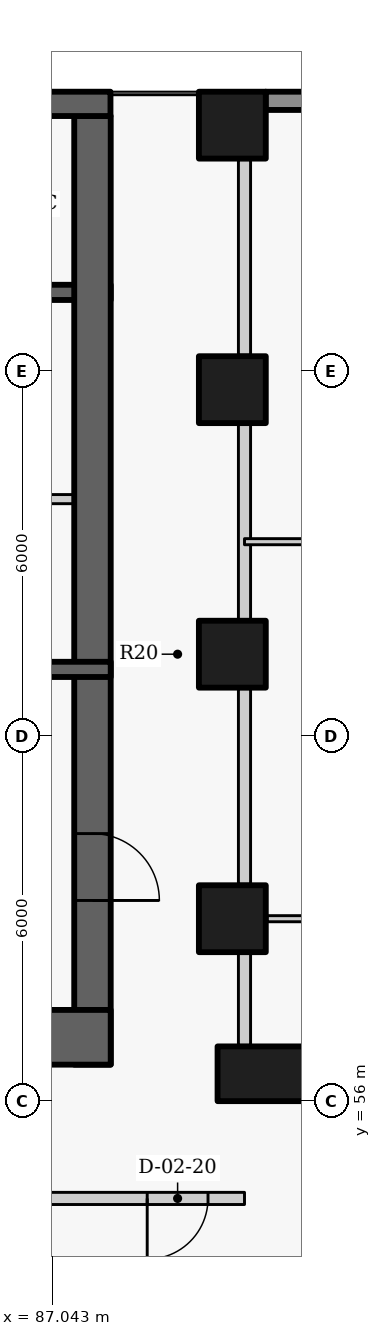
"""IFC4 building model, lengths in metres.
Left out: names, types, materials, properties, quantities, classifications, styles, units other than length and angle.
Written with IfcOpenShell. Run it as: python <this file> out.ifc"""

import sys

from ifc_helpers import new_model, si_unit, direction, frame, frame_2d, origin, origin_2d, place, context, subcontext, project, spatial, rectangle, extrude, element, fill, save


model = new_model("IFC4")
c1 = context("Model", 3, precision=1e-05, world=origin(), true_north=direction((0.0, 1.0)))
c2 = subcontext(c1, "Body", "Model", "MODEL_VIEW")
j1 = project(units=[si_unit("LENGTHUNIT", "METRE"), si_unit("PLANEANGLEUNIT", "RADIAN")], contexts=[c1])
p1 = place(None, origin())
s1 = spatial("IfcSite", under=j1, at=p1, CompositionType="ELEMENT")
p2 = place(p1, origin())
s2 = spatial("IfcBuilding", under=s1, at=p2, CompositionType="ELEMENT")
p3 = place(p2, frame((0.0, 0.0, 11.4)))
s3 = spatial("IfcBuildingStorey", under=s2, at=p3, CompositionType="ELEMENT", Elevation=11.4)
p4 = place(p3, frame((90.507, 56.45, 0.0), z_axis=(0.0, 0.0, 1.0), x_axis=(1.0, 0.0, 0.0)))
e1 = element("IfcColumn", 1, at=p4, inside=s3, PredefinedType="COLUMN", context=c2, shape_type="SweptSolid", body=[
    extrude(rectangle(XDim=1.5, YDim=0.9, at=origin_2d()), origin(), (0.0, 0.0, 1.0), 4.2),
])
for number, where, z_axis, x_axis in (
    (2, (90.0, 59.0, 0.0), (0.0, 0.0, 1.0), (0.0, 1.0, 0.0)),
    (3, (90.0, 63.35, 0.0), (0.0, 0.0, 1.0), (0.0, 1.0, 0.0)),
    (4, (90.0, 67.7, 0.0), (0.0, 0.0, 1.0), (0.0, 1.0, 0.0)),
    (5, (90.0, 72.05, 0.0), (0.0, 0.0, 1.0), (0.0, 1.0, 0.0)),
):
    element("IfcColumn", number, at=place(p3, frame(where, z_axis=z_axis, x_axis=x_axis)), inside=s3, PredefinedType="COLUMN", context=c2, shape_type="SweptSolid", body=[
        extrude(rectangle(XDim=1.1, YDim=1.1, at=origin_2d()), origin(), (0.0, 0.0, 1.0), 4.2),
    ])
p5 = place(p3, frame((96.562, 72.45, 0.0), z_axis=(0.0, 0.0, 1.0), x_axis=(-1.0, 0.0, 0.0)))
e6 = element("IfcWall", 6, at=p5, inside=s3, PredefinedType="SOLIDWALL", context=c2, shape_type="SweptSolid", body=[
    extrude(rectangle(XDim=6.016, YDim=0.3, at=frame_2d((3.008, 0.0))), origin(), (0.0, 0.0, 1.0), 3.0),
])
p6 = place(p5, frame((1.958, 0.0, 0.9)))
e7 = element("IfcOpeningElement", 7, at=p6, cuts=e6, PredefinedType="OPENING", context=c2, shape_type="SweptSolid", body=[
    extrude(rectangle(XDim=2.1, YDim=2.05, at=frame_2d((1.05, 1.025))), frame((0.0, 0.16, 0.0), z_axis=(0.0, -1.0, 0.0), x_axis=(1.0, 0.0, 0.0)), (0.0, 0.0, 1.0), 0.32),
])
p7 = place(p3, frame((85.4, 69.3, -0.3), z_axis=(0.0, 0.0, 1.0), x_axis=(1.0, 0.0, 0.0)))
e8 = element("IfcWall", 8, at=p7, inside=s3, PredefinedType="SHEAR", context=c2, shape_type="SweptSolid", body=[
    extrude(rectangle(XDim=2.6, YDim=0.25, at=frame_2d((1.3, 0.0))), origin(), (0.0, 0.0, 1.0), 4.2),
])
p8 = place(p7, frame((0.525, 0.0, 0.3)))
e9 = element("IfcOpeningElement", 9, at=p8, cuts=e8, PredefinedType="OPENING", context=c2, shape_type="SweptSolid", body=[
    extrude(rectangle(XDim=0.9, YDim=2.1, at=frame_2d((0.45, 1.05))), frame((0.0, 0.135, 0.0), z_axis=(0.0, -1.0, 0.0), x_axis=(1.0, 0.0, 0.0)), (0.0, 0.0, 1.0), 0.27),
])
p9 = place(p3, frame((87.7, 72.2, -0.3), z_axis=(0.0, 0.0, 1.0), x_axis=(0.0, -1.0, 0.0)))
e10 = element("IfcWall", 10, at=p9, inside=s3, PredefinedType="SHEAR", context=c2, shape_type="SweptSolid", body=[
    extrude(rectangle(XDim=15.6, YDim=0.6, at=frame_2d((7.8, 0.0))), origin(), (0.0, 0.0, 1.0), 4.2),
])
p10 = place(p9, frame((11.8, 0.0, 0.3)))
e11 = element("IfcOpeningElement", 11, at=p10, cuts=e10, PredefinedType="OPENING", context=c2, shape_type="SweptSolid", body=[
    extrude(rectangle(XDim=1.1, YDim=2.1, at=frame_2d((0.55, 1.05))), frame((0.0, 0.31, 0.0), z_axis=(0.0, -1.0, 0.0), x_axis=(1.0, 0.0, 0.0)), (0.0, 0.0, 1.0), 0.62),
])
p11 = place(p3, frame((88.0, 65.9, 0.0), z_axis=(0.0, 0.0, 1.0), x_axis=(-1.0, 0.0, 0.0)))
e12 = element("IfcWall", 12, at=p11, inside=s3, PredefinedType="PARTITIONING", context=c2, shape_type="SweptSolid", body=[
    extrude(rectangle(XDim=2.603, YDim=0.15, at=frame_2d((1.302, 0.0))), origin(), (0.0, 0.0, 1.0), 3.9),
])
p12 = place(p11, frame((1.175, 0.0, 0.0)))
e13 = element("IfcOpeningElement", 13, at=p12, cuts=e12, PredefinedType="OPENING", context=c2, shape_type="SweptSolid", body=[
    extrude(rectangle(XDim=0.9, YDim=2.1, at=frame_2d((0.45, 1.05))), frame((0.0, 0.085, 0.0), z_axis=(0.0, -1.0, 0.0), x_axis=(1.0, 0.0, 0.0)), (0.0, 0.0, 1.0), 0.17),
])
p13 = place(p3, frame((80.0, 63.1, -0.3), z_axis=(0.0, 0.0, 1.0), x_axis=(1.0, 0.0, 0.0)))
e14 = element("IfcWall", 14, at=p13, inside=s3, PredefinedType="SHEAR", context=c2, shape_type="SweptSolid", body=[
    extrude(rectangle(XDim=8.0, YDim=0.25, at=frame_2d((4.0, 0.0))), origin(), (0.0, 0.0, 1.0), 4.2),
])
p14 = place(p13, frame((3.849, 0.0, 0.3)))
e15 = element("IfcOpeningElement", 15, at=p14, cuts=e14, PredefinedType="OPENING", context=c2, shape_type="SweptSolid", body=[
    extrude(rectangle(XDim=1.1, YDim=2.1, at=frame_2d((0.55, 1.05))), frame((0.0, 0.135, 0.0), z_axis=(0.0, -1.0, 0.0), x_axis=(1.0, 0.0, 0.0)), (0.0, 0.0, 1.0), 0.27),
])
p15 = place(p3, frame((88.0, 57.05, -0.3), z_axis=(0.0, 0.0, 1.0), x_axis=(-1.0, 0.0, 0.0)))
e16 = element("IfcWall", 16, at=p15, inside=s3, PredefinedType="SHEAR", context=c2, shape_type="SweptSolid", body=[
    extrude(rectangle(XDim=4.6, YDim=0.9, at=frame_2d((2.3, 0.0))), origin(), (0.0, 0.0, 1.0), 4.2),
])
p16 = place(p15, frame((1.752, 0.0, 0.3)))
e17 = element("IfcOpeningElement", 17, at=p16, cuts=e16, PredefinedType="OPENING", context=c2, shape_type="SweptSolid", body=[
    extrude(rectangle(XDim=1.1, YDim=2.1, at=frame_2d((0.55, 1.05))), frame((0.0, 0.46, 0.0), z_axis=(0.0, -1.0, 0.0), x_axis=(1.0, 0.0, 0.0)), (0.0, 0.0, 1.0), 0.92),
])
p17 = place(p3, frame((90.2, 56.917, 0.0), z_axis=(0.0, 0.0, 1.0), x_axis=(0.0, 1.0, 0.0)))
e18 = element("IfcWall", 18, at=p17, inside=s3, PredefinedType="PARTITIONING", context=c2, shape_type="SweptSolid", body=[
    extrude(rectangle(XDim=1.516, YDim=0.2, at=frame_2d((0.758, 0.0))), origin(), (0.0, 0.0, 1.0), 3.9),
])
for number, where, z_axis, x_axis in (
    (19, (90.2, 59.567, 0.0), (0.0, 0.0, 1.0), (0.0, 1.0, 0.0)),
    (20, (90.2, 63.917, 0.0), (0.0, 0.0, 1.0), (0.0, 1.0, 0.0)),
):
    element("IfcWall", number, at=place(p3, frame(where, z_axis=z_axis, x_axis=x_axis)), inside=s3, PredefinedType="PARTITIONING", context=c2, shape_type="SweptSolid", body=[
        extrude(rectangle(XDim=3.216, YDim=0.2, at=frame_2d((1.608, 0.0))), origin(), (0.0, 0.0, 1.0), 3.13),
    ])
p18 = place(p3, frame((90.2, 68.267, 0.0), z_axis=(0.0, 0.0, 1.0), x_axis=(0.0, 1.0, 0.0)))
e21 = element("IfcWall", 21, at=p18, inside=s3, PredefinedType="PARTITIONING", context=c2, shape_type="SweptSolid", body=[
    extrude(rectangle(XDim=3.216, YDim=0.2, at=frame_2d((1.608, 0.0))), origin(), (0.0, 0.0, 1.0), 3.13),
])
p19 = place(p3, frame((90.2, 54.4, 0.0), z_axis=(0.0, 0.0, 1.0), x_axis=(-1.0, 0.0, 0.0)))
e22 = element("IfcWall", 22, at=p19, inside=s3, PredefinedType="PARTITIONING", context=c2, shape_type="SweptSolid", body=[
    extrude(rectangle(XDim=20.4, YDim=0.2, at=frame_2d((10.2, 0.0))), origin(), (0.0, 0.0, 1.0), 3.9),
])
p20 = place(p19, frame((18.8, 0.0, 0.0)))
e23 = element("IfcOpeningElement", 23, at=p20, cuts=e22, PredefinedType="OPENING", context=c2, shape_type="SweptSolid", body=[
    extrude(rectangle(XDim=1.0, YDim=2.1, at=frame_2d((0.5, 1.05))), frame((0.0, 0.11, 0.0), z_axis=(0.0, -1.0, 0.0), x_axis=(1.0, 0.0, 0.0)), (0.0, 0.0, 1.0), 0.22),
])
p21 = place(p19, frame((0.6, 0.0, 0.0)))
e24 = element("IfcOpeningElement", 24, at=p21, cuts=e22, PredefinedType="OPENING", context=c2, shape_type="SweptSolid", body=[
    extrude(rectangle(XDim=1.0, YDim=2.1, at=frame_2d((0.5, 1.05))), frame((0.0, 0.11, 0.0), z_axis=(0.0, -1.0, 0.0), x_axis=(1.0, 0.0, 0.0)), (0.0, 0.0, 1.0), 0.22),
])
p22 = place(p19, frame((10.1, 0.0, 0.0)))
e25 = element("IfcOpeningElement", 25, at=p22, cuts=e22, PredefinedType="OPENING", context=c2, shape_type="SweptSolid", body=[
    extrude(rectangle(XDim=1.0, YDim=2.1, at=frame_2d((0.5, 1.05))), frame((0.0, 0.11, 0.0), z_axis=(0.0, -1.0, 0.0), x_axis=(1.0, 0.0, 0.0)), (0.0, 0.0, 1.0), 0.22),
])
p23 = place(p3, frame((90.2, 65.2, 0.0), z_axis=(0.0, 0.0, 1.0), x_axis=(1.0, 0.0, 0.0)))
e26 = element("IfcWall", 26, at=p23, inside=s3, PredefinedType="PARTITIONING", context=c2, shape_type="SweptSolid", body=[
    extrude(rectangle(XDim=7.366, YDim=0.1, at=frame_2d((3.683, 0.0))), origin(), (0.0, 0.0, 1.0), 3.9),
])
p24 = place(p3, frame((90.57, 59.0, 0.0), z_axis=(0.0, 0.0, 1.0), x_axis=(1.0, 0.0, 0.0)))
e27 = element("IfcWall", 27, at=p24, inside=s3, PredefinedType="PARTITIONING", context=c2, shape_type="SweptSolid", body=[
    extrude(rectangle(XDim=3.956, YDim=0.1, at=frame_2d((1.978, 0.0))), origin(), (0.0, 0.0, 1.0), 3.9),
])
p25 = place(p3, frame((72.004, 72.4, -0.3), z_axis=(0.0, 0.0, 1.0), x_axis=(1.0, 0.0, 0.0)))
e28 = element("IfcWall", 28, at=p25, inside=s3, PredefinedType="SHEAR", context=c2, shape_type="SweptSolid", body=[
    extrude(rectangle(XDim=15.992, YDim=0.4, at=frame_2d((7.996, 0.0))), origin(), (0.0, 0.0, 1.0), 4.2),
])
p26 = place(p21, origin())
e29 = element("IfcDoor", 29, at=p26, inside=s3, OperationType="SINGLE_SWING_RIGHT", PredefinedType="DOOR", context=c2, shape_type="SweptSolid", body=[
    extrude(rectangle(XDim=1.0, YDim=2.1, at=frame_2d((0.5, 1.05))), frame((0.0, 0.025, 0.0), z_axis=(0.0, -1.0, 0.0), x_axis=(1.0, 0.0, 0.0)), (0.0, 0.0, 1.0), 0.05),
])
fill(e24, e29)
p27 = place(p10, origin())
e30 = element("IfcDoor", 30, at=p27, inside=s3, OperationType="SINGLE_SWING_RIGHT", PredefinedType="DOOR", context=c2, shape_type="SweptSolid", body=[
    extrude(rectangle(XDim=1.1, YDim=2.1, at=frame_2d((0.55, 1.05))), frame((0.0, 0.025, 0.0), z_axis=(0.0, -1.0, 0.0), x_axis=(1.0, 0.0, 0.0)), (0.0, 0.0, 1.0), 0.05),
])
fill(e11, e30)
save(model, sys.argv[1])
